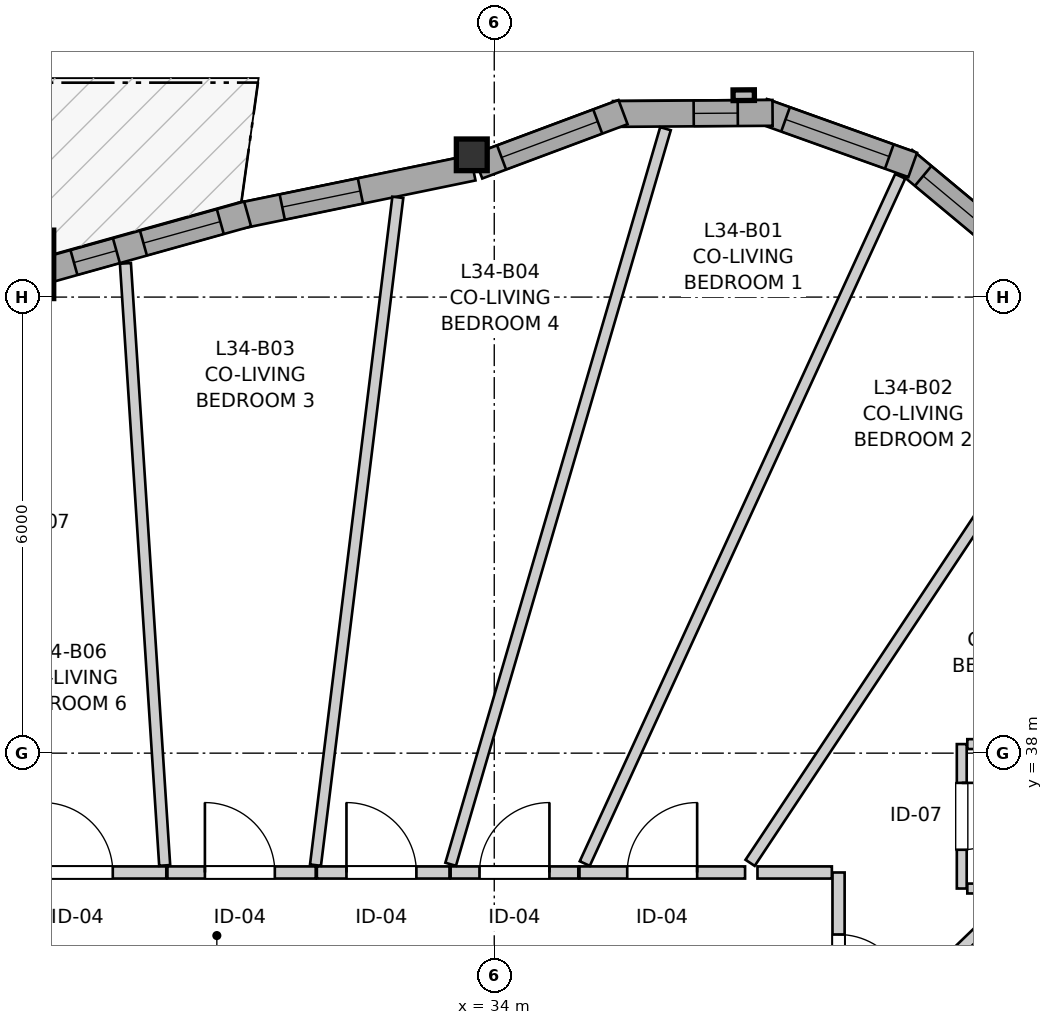
"""IFC4 building model, lengths in metres.
Left out: names, types, materials, properties, quantities, classifications, styles, units other than length and angle.
Written with IfcOpenShell. Run it as: python <this file> out.ifc"""

import sys

from ifc_helpers import new_model, si_unit, direction, frame, frame_2d, origin, origin_2d, place, context, subcontext, project, spatial, rectangle, i_section, extrude, source, transform, mapped, element, fill, save


model = new_model("IFC4")
c1 = context("Model", 3, precision=1e-05, world=origin(), true_north=direction((0.0, 1.0)))
c2 = subcontext(c1, "Body", "Model", "MODEL_VIEW")
j1 = project(units=[si_unit("LENGTHUNIT", "METRE"), si_unit("PLANEANGLEUNIT", "RADIAN")], contexts=[c1])
p1 = place(None, origin())
s1 = spatial("IfcSite", under=j1, at=p1, CompositionType="ELEMENT")
p2 = place(p1, origin())
s2 = spatial("IfcBuilding", under=s1, at=p2, CompositionType="ELEMENT")
p3 = place(p2, frame((0.0, 0.0, 115.2)))
s3 = spatial("IfcBuildingStorey", under=s2, at=p3, CompositionType="ELEMENT", Elevation=115.2)
m1 = source(origin(), c2, "Body", "SweptSolid", [
    extrude(i_section(OverallWidth=0.406, OverallDepth=0.416, WebThickness=0.027, FlangeThickness=0.044, FilletRadius=0.015, at=origin_2d()), origin(), (0.0, 0.0, 1.0), 2.95),
])
p4 = place(p3, frame((33.704, 45.872, 0.0), z_axis=(0.0, 0.0, 1.0), x_axis=(1.0, 0.0, 0.0)))
e1 = element("IfcColumn", 1, at=p4, inside=s3, PredefinedType="PILASTER", context=c2, shape_type="MappedRepresentation", body=[
    mapped(m1, transform((0.0, 0.0, 0.0), x_axis=(1.0, 0.0, 0.0), y_axis=(0.0, 1.0, 0.0), z_axis=(0.0, 0.0, 1.0), scale=1.0)),
])
m2 = source(origin(), c2, "Body", "SweptSolid", [
    extrude(rectangle(XDim=0.9, YDim=0.9, at=origin_2d()), origin(), (0.0, 0.0, 1.0), 2.95),
])
p5 = place(p3, frame((27.754, 44.431, 0.0), z_axis=(0.0, 0.0, 1.0), x_axis=(1.0, 0.0, 0.0)))
e2 = element("IfcColumn", 2, at=p5, inside=s3, PredefinedType="COLUMN", context=c2, shape_type="MappedRepresentation", body=[
    mapped(m2, transform((0.0, 0.0, 0.0), x_axis=(1.0, 0.0, 0.0), y_axis=(0.0, 1.0, 0.0), z_axis=(0.0, 0.0, 1.0), scale=1.0)),
])
p6 = place(p3, frame((41.002, 44.462, 0.0), z_axis=(0.0, 0.0, 1.0), x_axis=(-0.768488123124, 0.639864051669, 0.0)))
e3 = element("IfcWall", 3, at=p6, inside=s3, PredefinedType="SOLIDWALL", context=c2, shape_type="SweptSolid", body=[
    extrude(rectangle(XDim=2.099, YDim=0.34, at=frame_2d((1.05, 0.0))), origin(), (0.0, 0.0, 1.0), 2.48),
])
p7 = place(p6, frame((0.319, 0.0, 0.82)))
e4 = element("IfcOpeningElement", 4, at=p7, cuts=e3, PredefinedType="OPENING", context=c2, shape_type="SweptSolid", body=[
    extrude(rectangle(XDim=1.45, YDim=1.25, at=frame_2d((0.725, 0.625))), frame((0.0, 0.18, 0.0), z_axis=(0.0, -1.0, 0.0), x_axis=(1.0, 0.0, 0.0)), (0.0, 0.0, 1.0), 0.36),
])
p8 = place(p3, frame((39.506, 45.739, 0.0), z_axis=(0.0, 0.0, 1.0), x_axis=(-0.941486401639, 0.33705096874, 0.0)))
e5 = element("IfcWall", 5, at=p8, inside=s3, PredefinedType="SOLIDWALL", context=c2, shape_type="SweptSolid", body=[
    extrude(rectangle(XDim=2.099, YDim=0.34, at=frame_2d((1.05, 0.0))), origin(), (0.0, 0.0, 1.0), 2.48),
])
p9 = place(p8, frame((0.327, 0.0, 0.82)))
e6 = element("IfcOpeningElement", 6, at=p9, cuts=e5, PredefinedType="OPENING", context=c2, shape_type="SweptSolid", body=[
    extrude(rectangle(XDim=1.45, YDim=1.25, at=frame_2d((0.725, 0.625))), frame((0.0, 0.18, 0.0), z_axis=(0.0, -1.0, 0.0), x_axis=(1.0, 0.0, 0.0)), (0.0, 0.0, 1.0), 0.36),
])
p10 = place(p3, frame((37.662, 46.424, 0.0), z_axis=(0.0, 0.0, 1.0), x_axis=(-0.999976456891, -0.00686189939, 0.0)))
e7 = element("IfcWall", 7, at=p10, inside=s3, PredefinedType="SOLIDWALL", context=c2, shape_type="SweptSolid", body=[
    extrude(rectangle(XDim=2.099, YDim=0.34, at=frame_2d((1.05, 0.0))), origin(), (0.0, 0.0, 1.0), 2.48),
])
p11 = place(p10, frame((0.458, 0.0, 0.82)))
e8 = element("IfcOpeningElement", 8, at=p11, cuts=e7, PredefinedType="OPENING", context=c2, shape_type="SweptSolid", body=[
    extrude(rectangle(XDim=0.58, YDim=1.35, at=frame_2d((0.29, 0.675))), frame((0.0, 0.18, 0.0), z_axis=(0.0, -1.0, 0.0), x_axis=(1.0, 0.0, 0.0)), (0.0, 0.0, 1.0), 0.36),
])
p12 = place(p3, frame((35.695, 46.434, 0.0), z_axis=(0.0, 0.0, 1.0), x_axis=(-0.9368002254, -0.349864741994, 0.0)))
e9 = element("IfcWall", 9, at=p12, inside=s3, PredefinedType="SOLIDWALL", context=c2, shape_type="SweptSolid", body=[
    extrude(rectangle(XDim=2.041, YDim=0.34, at=frame_2d((1.021, 0.0))), origin(), (0.0, 0.0, 1.0), 2.48),
])
p13 = place(p12, frame((0.355, 0.0, 0.82)))
e10 = element("IfcOpeningElement", 10, at=p13, cuts=e9, PredefinedType="OPENING", context=c2, shape_type="SweptSolid", body=[
    extrude(rectangle(XDim=1.35, YDim=1.45, at=frame_2d((0.675, 0.725))), frame((0.0, 0.18, 0.0), z_axis=(0.0, -1.0, 0.0), x_axis=(1.0, 0.0, 0.0)), (0.0, 0.0, 1.0), 0.36),
])
p14 = place(p3, frame((33.719, 45.701, 0.0), z_axis=(0.0, 0.0, 1.0), x_axis=(-0.979417849231, -0.201843198072, 0.0)))
e11 = element("IfcWall", 11, at=p14, inside=s3, PredefinedType="SOLIDWALL", context=c2, shape_type="SweptSolid", body=[
    extrude(rectangle(XDim=3.113, YDim=0.34, at=frame_2d((1.557, 0.0))), origin(), (0.0, 0.0, 1.0), 2.48),
])
p15 = place(p14, frame((1.511, 0.0, 0.82)))
e12 = element("IfcOpeningElement", 12, at=p15, cuts=e11, PredefinedType="OPENING", context=c2, shape_type="SweptSolid", body=[
    extrude(rectangle(XDim=1.05, YDim=1.45, at=frame_2d((0.525, 0.725))), frame((0.0, 0.18, 0.0), z_axis=(0.0, -1.0, 0.0), x_axis=(1.0, 0.0, 0.0)), (0.0, 0.0, 1.0), 0.36),
])
p16 = place(p3, frame((30.755, 45.094, 0.0), z_axis=(0.0, 0.0, 1.0), x_axis=(-0.963040794714, -0.269355578589, 0.0)))
e13 = element("IfcWall", 13, at=p16, inside=s3, PredefinedType="SOLIDWALL", context=c2, shape_type="SweptSolid", body=[
    extrude(rectangle(XDim=2.839, YDim=0.34, at=frame_2d((1.419, 0.0))), origin(), (0.0, 0.0, 1.0), 2.48),
])
p17 = place(p16, frame((0.373, 0.0, 0.82)))
e14 = element("IfcOpeningElement", 14, at=p17, cuts=e13, PredefinedType="OPENING", context=c2, shape_type="SweptSolid", body=[
    extrude(rectangle(XDim=1.05, YDim=1.45, at=frame_2d((0.525, 0.725))), frame((0.0, 0.18, 0.0), z_axis=(0.0, -1.0, 0.0), x_axis=(1.0, 0.0, 0.0)), (0.0, 0.0, 1.0), 0.36),
])
p18 = place(p16, frame((1.792, 0.0, 0.82)))
e15 = element("IfcOpeningElement", 15, at=p18, cuts=e13, PredefinedType="OPENING", context=c2, shape_type="SweptSolid", body=[
    extrude(rectangle(XDim=0.58, YDim=1.35, at=frame_2d((0.29, 0.675))), frame((0.0, 0.18, 0.0), z_axis=(0.0, -1.0, 0.0), x_axis=(1.0, 0.0, 0.0)), (0.0, 0.0, 1.0), 0.36),
])
p19 = place(p3, frame((38.53, 36.43, 0.0), z_axis=(0.0, 0.0, 1.0), x_axis=(0.0, -1.0, 0.0)))
e16 = element("IfcWall", 16, at=p19, inside=s3, PredefinedType="PARTITIONING", context=c2, shape_type="SweptSolid", body=[
    extrude(rectangle(XDim=2.516, YDim=0.16, at=frame_2d((1.258, 0.0))), origin(), (0.0, 0.0, 1.0), 2.588),
])
p20 = place(p19, frame((0.816, 0.0, 0.0)))
e17 = element("IfcOpeningElement", 17, at=p20, cuts=e16, PredefinedType="OPENING", context=c2, shape_type="SweptSolid", body=[
    extrude(rectangle(XDim=0.92, YDim=2.1, at=frame_2d((0.46, 1.05))), frame((0.0, 0.09, 0.0), z_axis=(0.0, -1.0, 0.0), x_axis=(1.0, 0.0, 0.0)), (0.0, 0.0, 1.0), 0.18),
])
p21 = place(p3, frame((27.403, 36.43, 0.0), z_axis=(0.0, 0.0, 1.0), x_axis=(1.0, 0.0, 0.0)))
e18 = element("IfcWall", 18, at=p21, inside=s3, PredefinedType="PARTITIONING", context=c2, shape_type="SweptSolid", body=[
    extrude(rectangle(XDim=2.282, YDim=0.16, at=frame_2d((1.141, 0.0))), origin(), (0.0, 0.0, 1.0), 2.95),
])
p22 = place(p21, frame((0.658, 0.0, 0.0)))
e19 = element("IfcOpeningElement", 19, at=p22, cuts=e18, PredefinedType="OPENING", context=c2, shape_type="SweptSolid", body=[
    extrude(rectangle(XDim=0.92, YDim=2.1, at=frame_2d((0.46, 1.05))), frame((0.0, 0.09, 0.0), z_axis=(0.0, -1.0, 0.0), x_axis=(1.0, 0.0, 0.0)), (0.0, 0.0, 1.0), 0.18),
])
p23 = place(p3, frame((35.121, 36.43, 0.0), z_axis=(0.0, 0.0, 1.0), x_axis=(1.0, 0.0, 0.0)))
e20 = element("IfcWall", 20, at=p23, inside=s3, PredefinedType="PARTITIONING", context=c2, shape_type="SweptSolid", body=[
    extrude(rectangle(XDim=2.179, YDim=0.16, at=frame_2d((1.089, 0.0))), origin(), (0.0, 0.0, 1.0), 2.588),
])
p24 = place(p23, frame((0.628, 0.0, 0.0)))
e21 = element("IfcOpeningElement", 21, at=p24, cuts=e20, PredefinedType="OPENING", context=c2, shape_type="SweptSolid", body=[
    extrude(rectangle(XDim=0.92, YDim=2.1, at=frame_2d((0.46, 1.05))), frame((0.0, 0.09, 0.0), z_axis=(0.0, -1.0, 0.0), x_axis=(1.0, 0.0, 0.0)), (0.0, 0.0, 1.0), 0.18),
])
p25 = place(p3, frame((29.7, 36.43, 0.0), z_axis=(0.0, 0.0, 1.0), x_axis=(1.0, 0.0, 0.0)))
e22 = element("IfcWall", 22, at=p25, inside=s3, PredefinedType="PARTITIONING", context=c2, shape_type="SweptSolid", body=[
    extrude(rectangle(XDim=1.951, YDim=0.16, at=frame_2d((0.976, 0.0))), origin(), (0.0, 0.0, 1.0), 2.95),
])
p26 = place(p25, frame((0.493, 0.0, 0.0)))
e23 = element("IfcOpeningElement", 23, at=p26, cuts=e22, PredefinedType="OPENING", context=c2, shape_type="SweptSolid", body=[
    extrude(rectangle(XDim=0.92, YDim=2.1, at=frame_2d((0.46, 1.05))), frame((0.0, 0.09, 0.0), z_axis=(0.0, -1.0, 0.0), x_axis=(1.0, 0.0, 0.0)), (0.0, 0.0, 1.0), 0.18),
])
p27 = place(p3, frame((40.151, 38.119, 0.0), z_axis=(0.0, 0.0, 1.0), x_axis=(0.0, -1.0, 0.0)))
e24 = element("IfcWall", 24, at=p27, inside=s3, PredefinedType="PARTITIONING", context=c2, shape_type="SweptSolid", body=[
    extrude(rectangle(XDim=1.9, YDim=0.13, at=frame_2d((0.95, 0.0))), origin(), (0.0, 0.0, 1.0), 2.95),
])
p28 = place(p27, frame((0.51, 0.0, 0.0)))
e25 = element("IfcOpeningElement", 25, at=p28, cuts=e24, PredefinedType="OPENING", context=c2, shape_type="SweptSolid", body=[
    extrude(rectangle(XDim=0.88, YDim=2.05, at=frame_2d((0.44, 1.025))), frame((0.0, 0.075, 0.0), z_axis=(0.0, -1.0, 0.0), x_axis=(1.0, 0.0, 0.0)), (0.0, 0.0, 1.0), 0.15),
])
p29 = place(p3, frame((31.666, 36.43, 0.0), z_axis=(0.0, 0.0, 1.0), x_axis=(1.0, 0.0, 0.0)))
e26 = element("IfcWall", 26, at=p29, inside=s3, PredefinedType="PARTITIONING", context=c2, shape_type="SweptSolid", body=[
    extrude(rectangle(XDim=1.745, YDim=0.16, at=frame_2d((0.873, 0.0))), origin(), (0.0, 0.0, 1.0), 2.95),
])
p30 = place(p29, frame((0.389, 0.0, 0.0)))
e27 = element("IfcOpeningElement", 27, at=p30, cuts=e26, PredefinedType="OPENING", context=c2, shape_type="SweptSolid", body=[
    extrude(rectangle(XDim=0.92, YDim=2.1, at=frame_2d((0.46, 1.05))), frame((0.0, 0.09, 0.0), z_axis=(0.0, -1.0, 0.0), x_axis=(1.0, 0.0, 0.0)), (0.0, 0.0, 1.0), 0.18),
])
p31 = place(p3, frame((33.426, 36.43, 0.0), z_axis=(0.0, 0.0, 1.0), x_axis=(1.0, 0.0, 0.0)))
e28 = element("IfcWall", 28, at=p31, inside=s3, PredefinedType="PARTITIONING", context=c2, shape_type="SweptSolid", body=[
    extrude(rectangle(XDim=1.68, YDim=0.16, at=frame_2d((0.84, 0.0))), origin(), (0.0, 0.0, 1.0), 2.95),
])
p32 = place(p31, frame((0.38, 0.0, 0.0)))
e29 = element("IfcOpeningElement", 29, at=p32, cuts=e28, PredefinedType="OPENING", context=c2, shape_type="SweptSolid", body=[
    extrude(rectangle(XDim=0.92, YDim=2.1, at=frame_2d((0.46, 1.05))), frame((0.0, 0.09, 0.0), z_axis=(0.0, -1.0, 0.0), x_axis=(1.0, 0.0, 0.0)), (0.0, 0.0, 1.0), 0.18),
])
p33 = place(p3, frame((33.427, 36.538, 0.0), z_axis=(0.0, 0.0, 1.0), x_axis=(0.280326379037, 0.959904745908, 0.0)))
e30 = element("IfcWall", 30, at=p33, inside=s3, PredefinedType="PARTITIONING", context=c2, shape_type="SweptSolid", body=[
    extrude(rectangle(XDim=10.082, YDim=0.145, at=frame_2d((5.041, 0.0))), origin(), (0.0, 0.0, 1.0), 2.95),
])
p34 = place(p3, frame((35.191, 36.548, 0.0), z_axis=(0.0, 0.0, 1.0), x_axis=(0.417154036681, 0.908835799075, 0.0)))
e31 = element("IfcWall", 31, at=p34, inside=s3, PredefinedType="PARTITIONING", context=c2, shape_type="SweptSolid", body=[
    extrude(rectangle(XDim=9.949, YDim=0.145, at=frame_2d((4.974, 0.0))), origin(), (0.0, 0.0, 1.0), 2.95),
])
p35 = place(p3, frame((31.648, 36.527, 0.0), z_axis=(0.0, 0.0, 1.0), x_axis=(0.122371290087, 0.992484391496, 0.0)))
e32 = element("IfcWall", 32, at=p35, inside=s3, PredefinedType="PARTITIONING", context=c2, shape_type="SweptSolid", body=[
    extrude(rectangle(XDim=8.852, YDim=0.145, at=frame_2d((4.426, 0.0))), origin(), (0.0, 0.0, 1.0), 2.95),
])
p36 = place(p3, frame((29.147, 44.444, 0.0), z_axis=(0.0, 0.0, 1.0), x_axis=(0.065112427166, -0.997877934333, 0.0)))
e33 = element("IfcWall", 33, at=p36, inside=s3, PredefinedType="PARTITIONING", context=c2, shape_type="SweptSolid", body=[
    extrude(rectangle(XDim=7.938, YDim=0.145, at=frame_2d((3.969, 0.0))), origin(), (0.0, 0.0, 1.0), 2.95),
])
p37 = place(p3, frame((37.366, 36.557, 0.0), z_axis=(0.0, 0.0, 1.0), x_axis=(0.553463679146, 0.832873313215, 0.0)))
e34 = element("IfcWall", 34, at=p37, inside=s3, PredefinedType="PARTITIONING", context=c2, shape_type="SweptSolid", body=[
    extrude(rectangle(XDim=7.704, YDim=0.145, at=frame_2d((3.852, 0.0))), origin(), (0.0, 0.0, 1.0), 2.95),
])
p38 = place(p3, frame((38.666, 34.009, 0.0), z_axis=(0.0, 0.0, 1.0), x_axis=(0.72031454127, 0.693647577402, 0.0)))
e35 = element("IfcWall", 35, at=p38, inside=s3, PredefinedType="PARTITIONING", context=c2, shape_type="SweptSolid", body=[
    extrude(rectangle(XDim=3.186, YDim=0.145, at=frame_2d((1.593, 0.0))), origin(), (0.0, 0.0, 1.0), 2.95),
])
p39 = place(p3, frame((40.224, 38.119, 0.0), z_axis=(0.0, 0.0, 1.0), x_axis=(1.0, 0.0, 0.0)))
e36 = element("IfcWall", 36, at=p39, inside=s3, PredefinedType="PARTITIONING", context=c2, shape_type="SweptSolid", body=[
    extrude(rectangle(XDim=1.727, YDim=0.13, at=frame_2d((0.863, 0.0))), origin(), (0.0, 0.0, 1.0), 2.95),
])
p40 = place(p3, frame((37.463, 36.43, 0.0), z_axis=(0.0, 0.0, 1.0), x_axis=(1.0, 0.0, 0.0)))
e37 = element("IfcWall", 37, at=p40, inside=s3, PredefinedType="PARTITIONING", context=c2, shape_type="SweptSolid", body=[
    extrude(rectangle(XDim=0.979, YDim=0.16, at=frame_2d((0.489, 0.0))), origin(), (0.0, 0.0, 1.0), 2.588),
])
p41 = place(p3, frame((40.224, 36.219, 0.0), z_axis=(0.0, 0.0, 1.0), x_axis=(1.0, 0.0, 0.0)))
e38 = element("IfcWall", 38, at=p41, inside=s3, PredefinedType="PARTITIONING", context=c2, shape_type="SweptSolid", body=[
    extrude(rectangle(XDim=0.557, YDim=0.13, at=frame_2d((0.278, 0.0))), origin(), (0.0, 0.0, 1.0), 2.95),
])
m3 = source(origin(), c2, "Body", "SweptSolid", [
    extrude(rectangle(XDim=1.45, YDim=1.25, at=frame_2d((0.725, 0.625))), frame((0.0, 0.03, 0.0), z_axis=(0.0, -1.0, 0.0), x_axis=(1.0, 0.0, 0.0)), (0.0, 0.0, 1.0), 0.06),
])
p42 = place(p7, origin())
e39 = element("IfcWindow", 39, at=p42, inside=s3, PartitioningType="SINGLE_PANEL", PredefinedType="WINDOW", context=c2, shape_type="MappedRepresentation", body=[
    mapped(m3, transform((0.0, 0.0, 0.0), x_axis=(1.0, 0.0, 0.0), y_axis=(0.0, 1.0, 0.0), z_axis=(0.0, 0.0, 1.0), scale=1.0)),
])
fill(e4, e39)
p43 = place(p9, origin())
e40 = element("IfcWindow", 40, at=p43, inside=s3, PartitioningType="SINGLE_PANEL", PredefinedType="WINDOW", context=c2, shape_type="MappedRepresentation", body=[
    mapped(m3, transform((0.0, 0.0, 0.0), x_axis=(1.0, 0.0, 0.0), y_axis=(0.0, 1.0, 0.0), z_axis=(0.0, 0.0, 1.0), scale=1.0)),
])
fill(e6, e40)
m4 = source(origin(), c2, "Body", "SweptSolid", [
    extrude(rectangle(XDim=0.58, YDim=1.35, at=frame_2d((0.29, 0.675))), frame((0.0, 0.03, 0.0), z_axis=(0.0, -1.0, 0.0), x_axis=(1.0, 0.0, 0.0)), (0.0, 0.0, 1.0), 0.06),
])
p44 = place(p11, origin())
e41 = element("IfcWindow", 41, at=p44, inside=s3, PartitioningType="SINGLE_PANEL", PredefinedType="WINDOW", context=c2, shape_type="MappedRepresentation", body=[
    mapped(m4, transform((0.0, 0.0, 0.0), x_axis=(1.0, 0.0, 0.0), y_axis=(0.0, 1.0, 0.0), z_axis=(0.0, 0.0, 1.0), scale=1.0)),
])
fill(e8, e41)
m5 = source(origin(), c2, "Body", "SweptSolid", [
    extrude(rectangle(XDim=1.35, YDim=1.45, at=frame_2d((0.675, 0.725))), frame((0.0, 0.03, 0.0), z_axis=(0.0, -1.0, 0.0), x_axis=(1.0, 0.0, 0.0)), (0.0, 0.0, 1.0), 0.06),
])
p45 = place(p13, origin())
e42 = element("IfcWindow", 42, at=p45, inside=s3, PartitioningType="SINGLE_PANEL", PredefinedType="WINDOW", context=c2, shape_type="MappedRepresentation", body=[
    mapped(m5, transform((0.0, 0.0, 0.0), x_axis=(1.0, 0.0, 0.0), y_axis=(0.0, 1.0, 0.0), z_axis=(0.0, 0.0, 1.0), scale=1.0)),
])
fill(e10, e42)
m6 = source(origin(), c2, "Body", "SweptSolid", [
    extrude(rectangle(XDim=1.05, YDim=1.45, at=frame_2d((0.525, 0.725))), frame((0.0, 0.03, 0.0), z_axis=(0.0, -1.0, 0.0), x_axis=(1.0, 0.0, 0.0)), (0.0, 0.0, 1.0), 0.06),
])
p46 = place(p15, origin())
e43 = element("IfcWindow", 43, at=p46, inside=s3, PartitioningType="SINGLE_PANEL", PredefinedType="WINDOW", context=c2, shape_type="MappedRepresentation", body=[
    mapped(m6, transform((0.0, 0.0, 0.0), x_axis=(1.0, 0.0, 0.0), y_axis=(0.0, 1.0, 0.0), z_axis=(0.0, 0.0, 1.0), scale=1.0)),
])
fill(e12, e43)
p47 = place(p17, origin())
e44 = element("IfcWindow", 44, at=p47, inside=s3, PartitioningType="SINGLE_PANEL", PredefinedType="WINDOW", context=c2, shape_type="MappedRepresentation", body=[
    mapped(m6, transform((0.0, 0.0, 0.0), x_axis=(1.0, 0.0, 0.0), y_axis=(0.0, 1.0, 0.0), z_axis=(0.0, 0.0, 1.0), scale=1.0)),
])
fill(e14, e44)
p48 = place(p18, origin())
e45 = element("IfcWindow", 45, at=p48, inside=s3, PartitioningType="SINGLE_PANEL", PredefinedType="WINDOW", context=c2, shape_type="MappedRepresentation", body=[
    mapped(m4, transform((0.0, 0.0, 0.0), x_axis=(1.0, 0.0, 0.0), y_axis=(0.0, 1.0, 0.0), z_axis=(0.0, 0.0, 1.0), scale=1.0)),
])
fill(e15, e45)
m7 = source(origin(), c2, "Body", "SweptSolid", [
    extrude(rectangle(XDim=0.92, YDim=2.1, at=frame_2d((0.46, 1.05))), frame((0.0, 0.025, 0.0), z_axis=(0.0, -1.0, 0.0), x_axis=(1.0, 0.0, 0.0)), (0.0, 0.0, 1.0), 0.05),
])
p49 = place(p20, origin())
e46 = element("IfcDoor", 46, at=p49, inside=s3, OperationType="SINGLE_SWING_RIGHT", PredefinedType="DOOR", context=c2, shape_type="MappedRepresentation", body=[
    mapped(m7, transform((0.0, 0.0, 0.0), x_axis=(1.0, 0.0, 0.0), y_axis=(0.0, 1.0, 0.0), z_axis=(0.0, 0.0, 1.0), scale=1.0)),
])
fill(e17, e46)
p50 = place(p22, origin())
e47 = element("IfcDoor", 47, at=p50, inside=s3, OperationType="SINGLE_SWING_LEFT", PredefinedType="DOOR", context=c2, shape_type="MappedRepresentation", body=[
    mapped(m7, transform((0.0, 0.0, 0.0), x_axis=(1.0, 0.0, 0.0), y_axis=(0.0, 1.0, 0.0), z_axis=(0.0, 0.0, 1.0), scale=1.0)),
])
fill(e19, e47)
p51 = place(p24, origin())
e48 = element("IfcDoor", 48, at=p51, inside=s3, OperationType="SINGLE_SWING_RIGHT", PredefinedType="DOOR", context=c2, shape_type="MappedRepresentation", body=[
    mapped(m7, transform((0.0, 0.0, 0.0), x_axis=(1.0, 0.0, 0.0), y_axis=(0.0, 1.0, 0.0), z_axis=(0.0, 0.0, 1.0), scale=1.0)),
])
fill(e21, e48)
p52 = place(p26, origin())
e49 = element("IfcDoor", 49, at=p52, inside=s3, OperationType="SINGLE_SWING_LEFT", PredefinedType="DOOR", context=c2, shape_type="MappedRepresentation", body=[
    mapped(m7, transform((0.0, 0.0, 0.0), x_axis=(1.0, 0.0, 0.0), y_axis=(0.0, 1.0, 0.0), z_axis=(0.0, 0.0, 1.0), scale=1.0)),
])
fill(e23, e49)
m8 = source(origin(), c2, "Body", "SweptSolid", [
    extrude(rectangle(XDim=0.88, YDim=2.05, at=frame_2d((0.44, 1.025))), frame((0.0, 0.025, 0.0), z_axis=(0.0, -1.0, 0.0), x_axis=(1.0, 0.0, 0.0)), (0.0, 0.0, 1.0), 0.05),
])
p53 = place(p28, origin())
e50 = element("IfcDoor", 50, at=p53, inside=s3, OperationType="SINGLE_SWING_LEFT", PredefinedType="DOOR", context=c2, shape_type="MappedRepresentation", body=[
    mapped(m8, transform((0.0, 0.0, 0.0), x_axis=(1.0, 0.0, 0.0), y_axis=(0.0, 1.0, 0.0), z_axis=(0.0, 0.0, 1.0), scale=1.0)),
])
fill(e25, e50)
p54 = place(p30, origin())
e51 = element("IfcDoor", 51, at=p54, inside=s3, OperationType="SINGLE_SWING_LEFT", PredefinedType="DOOR", context=c2, shape_type="MappedRepresentation", body=[
    mapped(m7, transform((0.0, 0.0, 0.0), x_axis=(1.0, 0.0, 0.0), y_axis=(0.0, 1.0, 0.0), z_axis=(0.0, 0.0, 1.0), scale=1.0)),
])
fill(e27, e51)
p55 = place(p32, origin())
e52 = element("IfcDoor", 52, at=p55, inside=s3, OperationType="SINGLE_SWING_RIGHT", PredefinedType="DOOR", context=c2, shape_type="MappedRepresentation", body=[
    mapped(m7, transform((0.0, 0.0, 0.0), x_axis=(1.0, 0.0, 0.0), y_axis=(0.0, 1.0, 0.0), z_axis=(0.0, 0.0, 1.0), scale=1.0)),
])
fill(e29, e52)
save(model, sys.argv[1])
